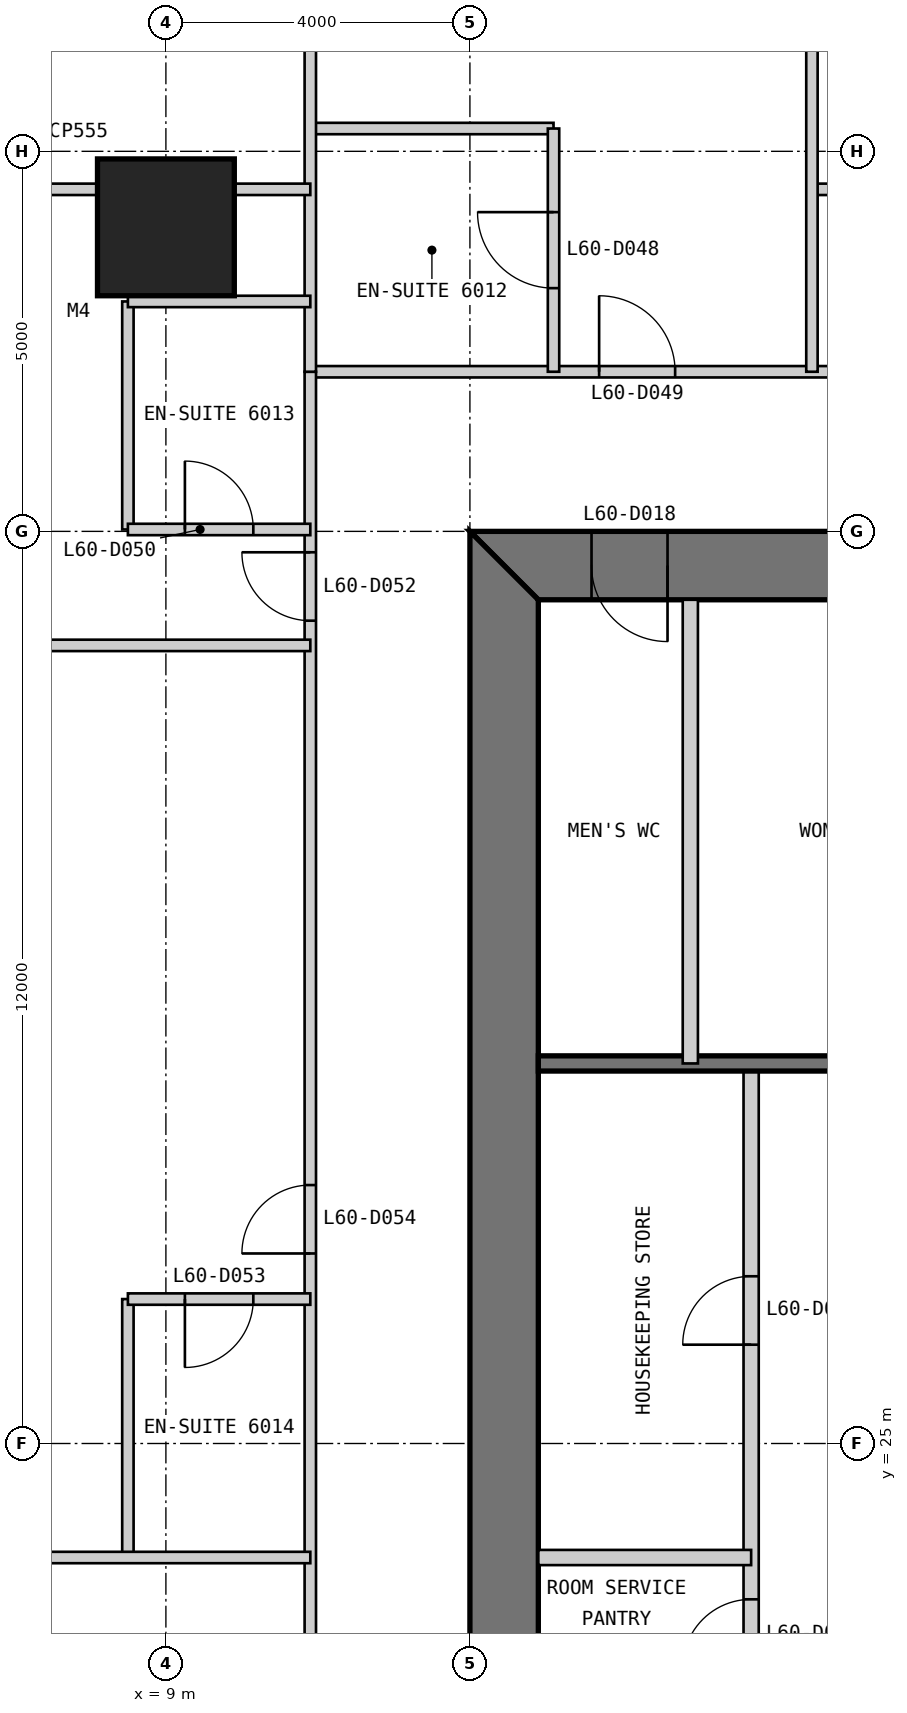
"""IFC4 building model, lengths in metres.
Left out: names, types, materials, properties, quantities, classifications, styles, units other than length and angle.
Written with IfcOpenShell. Run it as: python <this file> out.ifc"""

import sys

from ifc_helpers import new_model, si_unit, direction, frame, frame_2d, origin, origin_2d, place, context, subcontext, project, spatial, polyline, rectangle, outline, extrude, element, fill, save


model = new_model("IFC4")
c1 = context("Model", 3, precision=1e-05, world=origin(), true_north=direction((0.0, 1.0)))
c2 = subcontext(c1, "Body", "Model", "MODEL_VIEW")
j1 = project(units=[si_unit("LENGTHUNIT", "METRE"), si_unit("PLANEANGLEUNIT", "RADIAN")], contexts=[c1])
p1 = place(None, origin())
s1 = spatial("IfcSite", under=j1, at=p1, CompositionType="ELEMENT")
p2 = place(p1, origin())
s2 = spatial("IfcBuilding", under=s1, at=p2, CompositionType="ELEMENT")
p3 = place(p2, frame((0.0, 0.0, 256.0)))
s3 = spatial("IfcBuildingStorey", under=s2, at=p3, CompositionType="ELEMENT", Elevation=256.0)
p4 = place(p3, frame((9.0, 41.0, 0.0), z_axis=(0.0, 0.0, 1.0), x_axis=(1.0, 0.0, 0.0)))
e1 = element("IfcColumn", 1, at=p4, inside=s3, PredefinedType="COLUMN", context=c2, shape_type="SweptSolid", body=[
    extrude(rectangle(XDim=1.8, YDim=1.8, at=origin_2d()), origin(), (0.0, 0.0, 1.0), 3.4),
])
p5 = place(p3, frame((37.0, 36.55, 0.0), z_axis=(0.0, 0.0, 1.0), x_axis=(-1.0, 0.0, 0.0)))
e2 = element("IfcWall", 2, at=p5, inside=s3, PredefinedType="SHEAR", context=c2, shape_type="SweptSolid", body=[
    extrude(outline(polyline([(0.0, -0.45), (24.0, -0.45), (23.1, 0.45), (0.9, 0.45), (0.0, -0.45)])), origin(), (0.0, 0.0, 1.0), 3.4),
])
p6 = place(p5, frame((4.9, 0.0, 0.0)))
e3 = element("IfcOpeningElement", 3, at=p6, cuts=e2, PredefinedType="OPENING", context=c2, shape_type="SweptSolid", body=[
    extrude(rectangle(XDim=1.0, YDim=2.2, at=frame_2d((0.5, 1.1))), frame((0.0, 0.46, 0.0), z_axis=(0.0, -1.0, 0.0), x_axis=(1.0, 0.0, 0.0)), (0.0, 0.0, 1.0), 0.92),
])
p7 = place(p5, frame((8.9, 0.0, 0.0)))
e4 = element("IfcOpeningElement", 4, at=p7, cuts=e2, PredefinedType="OPENING", context=c2, shape_type="SweptSolid", body=[
    extrude(rectangle(XDim=1.1, YDim=2.2, at=frame_2d((0.55, 1.1))), frame((0.0, 0.46, 0.0), z_axis=(0.0, -1.0, 0.0), x_axis=(1.0, 0.0, 0.0)), (0.0, 0.0, 1.0), 0.92),
])
p8 = place(p5, frame((15.05, 0.0, 0.0)))
e5 = element("IfcOpeningElement", 5, at=p8, cuts=e2, PredefinedType="OPENING", context=c2, shape_type="SweptSolid", body=[
    extrude(rectangle(XDim=0.9, YDim=2.2, at=frame_2d((0.45, 1.1))), frame((0.0, 0.46, 0.0), z_axis=(0.0, -1.0, 0.0), x_axis=(1.0, 0.0, 0.0)), (0.0, 0.0, 1.0), 0.92),
])
p9 = place(p5, frame((17.9, 0.0, 0.0)))
e6 = element("IfcOpeningElement", 6, at=p9, cuts=e2, PredefinedType="OPENING", context=c2, shape_type="SweptSolid", body=[
    extrude(rectangle(XDim=1.0, YDim=2.2, at=frame_2d((0.5, 1.1))), frame((0.0, 0.46, 0.0), z_axis=(0.0, -1.0, 0.0), x_axis=(1.0, 0.0, 0.0)), (0.0, 0.0, 1.0), 0.92),
])
p10 = place(p5, frame((21.4, 0.0, 0.0)))
e7 = element("IfcOpeningElement", 7, at=p10, cuts=e2, PredefinedType="OPENING", context=c2, shape_type="SweptSolid", body=[
    extrude(rectangle(XDim=1.0, YDim=2.2, at=frame_2d((0.5, 1.1))), frame((0.0, 0.46, 0.0), z_axis=(0.0, -1.0, 0.0), x_axis=(1.0, 0.0, 0.0)), (0.0, 0.0, 1.0), 0.92),
])
p11 = place(p3, frame((13.45, 36.1, 0.0), z_axis=(0.0, 0.0, 1.0), x_axis=(0.0, -1.0, 0.0)))
e8 = element("IfcWall", 8, at=p11, inside=s3, PredefinedType="SHEAR", context=c2, shape_type="SweptSolid", body=[
    extrude(outline(polyline([(-0.9, -0.45), (23.1, -0.45), (22.2, 0.45), (0.0, 0.45), (-0.9, -0.45)])), origin(), (0.0, 0.0, 1.0), 3.4),
])
p12 = place(p11, frame((20.2, 0.0, 0.0)))
e9 = element("IfcOpeningElement", 9, at=p12, cuts=e8, PredefinedType="OPENING", context=c2, shape_type="SweptSolid", body=[
    extrude(rectangle(XDim=1.0, YDim=2.2, at=frame_2d((0.5, 1.1))), frame((0.0, 0.46, 0.0), z_axis=(0.0, -1.0, 0.0), x_axis=(1.0, 0.0, 0.0)), (0.0, 0.0, 1.0), 0.92),
])
p13 = place(p11, frame((17.25, 0.0, 0.0)))
e10 = element("IfcOpeningElement", 10, at=p13, cuts=e8, PredefinedType="OPENING", context=c2, shape_type="SweptSolid", body=[
    extrude(rectangle(XDim=0.9, YDim=2.2, at=frame_2d((0.45, 1.1))), frame((0.0, 0.46, 0.0), z_axis=(0.0, -1.0, 0.0), x_axis=(1.0, 0.0, 0.0)), (0.0, 0.0, 1.0), 0.92),
])
p14 = place(p3, frame((16.7, 13.9, 0.0), z_axis=(0.0, 0.0, 1.0), x_axis=(0.0, 1.0, 0.0)))
e11 = element("IfcWall", 11, at=p14, inside=s3, PredefinedType="PARTITIONING", context=c2, shape_type="SweptSolid", body=[
    extrude(rectangle(XDim=16.1, YDim=0.2, at=frame_2d((8.05, 0.0))), origin(), (0.0, 0.0, 1.0), 3.2),
])
p15 = place(p14, frame((8.15, 0.0, 0.0)))
e12 = element("IfcOpeningElement", 12, at=p15, cuts=e11, PredefinedType="OPENING", context=c2, shape_type="SweptSolid", body=[
    extrude(rectangle(XDim=0.9, YDim=2.2, at=frame_2d((0.45, 1.1))), frame((0.0, 0.11, 0.0), z_axis=(0.0, -1.0, 0.0), x_axis=(1.0, 0.0, 0.0)), (0.0, 0.0, 1.0), 0.22),
])
p16 = place(p14, frame((12.4, 0.0, 0.0)))
e13 = element("IfcOpeningElement", 13, at=p16, cuts=e11, PredefinedType="OPENING", context=c2, shape_type="SweptSolid", body=[
    extrude(rectangle(XDim=0.9, YDim=2.2, at=frame_2d((0.45, 1.1))), frame((0.0, 0.11, 0.0), z_axis=(0.0, -1.0, 0.0), x_axis=(1.0, 0.0, 0.0)), (0.0, 0.0, 1.0), 0.22),
])
p17 = place(p3, frame((13.9, 23.5, 0.0), z_axis=(0.0, 0.0, 1.0), x_axis=(1.0, 0.0, 0.0)))
e14 = element("IfcWall", 14, at=p17, inside=s3, PredefinedType="PARTITIONING", context=c2, shape_type="SweptSolid", body=[
    extrude(rectangle(XDim=2.8, YDim=0.2, at=frame_2d((1.4, 0.0))), origin(), (0.0, 0.0, 1.0), 3.2),
])
p18 = place(p3, frame((29.7, 30.0, 0.0), z_axis=(0.0, 0.0, 1.0), x_axis=(-1.0, 0.0, 0.0)))
e15 = element("IfcWall", 15, at=p18, inside=s3, PredefinedType="SOLIDWALL", context=c2, shape_type="SweptSolid", body=[
    extrude(rectangle(XDim=15.8, YDim=0.2, at=frame_2d((7.9, 0.0))), origin(), (0.0, 0.0, 1.0), 3.2),
])
p19 = place(p3, frame((15.9, 36.1, 0.0), z_axis=(0.0, 0.0, 1.0), x_axis=(0.0, -1.0, 0.0)))
e16 = element("IfcWall", 16, at=p19, inside=s3, PredefinedType="PARTITIONING", context=c2, shape_type="SweptSolid", body=[
    extrude(rectangle(XDim=6.1, YDim=0.2, at=frame_2d((3.05, 0.0))), origin(), (0.0, 0.0, 1.0), 3.2),
])
p20 = place(p3, frame((39.1, 39.1, 0.0), z_axis=(0.0, 0.0, 1.0), x_axis=(-1.0, 0.0, 0.0)))
e17 = element("IfcWall", 17, at=p20, inside=s3, PredefinedType="PARTITIONING", context=c2, shape_type="SweptSolid", body=[
    extrude(rectangle(XDim=28.2, YDim=0.15, at=frame_2d((14.1, 0.0))), origin(), (0.0, 0.0, 1.0), 3.25),
])
p21 = place(p20, frame((2.375, 0.0, 0.0)))
e18 = element("IfcOpeningElement", 18, at=p21, cuts=e17, PredefinedType="OPENING", context=c2, shape_type="SweptSolid", body=[
    extrude(rectangle(XDim=0.9, YDim=2.1, at=frame_2d((0.45, 1.05))), frame((0.0, 0.085, 0.0), z_axis=(0.0, -1.0, 0.0), x_axis=(1.0, 0.0, 0.0)), (0.0, 0.0, 1.0), 0.17),
])
p22 = place(p20, frame((10.7, 0.0, 0.0)))
e19 = element("IfcOpeningElement", 19, at=p22, cuts=e17, PredefinedType="OPENING", context=c2, shape_type="SweptSolid", body=[
    extrude(rectangle(XDim=0.9, YDim=2.1, at=frame_2d((0.45, 1.05))), frame((0.0, 0.085, 0.0), z_axis=(0.0, -1.0, 0.0), x_axis=(1.0, 0.0, 0.0)), (0.0, 0.0, 1.0), 0.17),
])
p23 = place(p20, frame((17.1, 0.0, 0.0)))
e20 = element("IfcOpeningElement", 20, at=p23, cuts=e17, PredefinedType="OPENING", context=c2, shape_type="SweptSolid", body=[
    extrude(rectangle(XDim=0.9, YDim=2.1, at=frame_2d((0.45, 1.05))), frame((0.0, 0.085, 0.0), z_axis=(0.0, -1.0, 0.0), x_axis=(1.0, 0.0, 0.0)), (0.0, 0.0, 1.0), 0.17),
])
p24 = place(p20, frame((23.4, 0.0, 0.0)))
e21 = element("IfcOpeningElement", 21, at=p24, cuts=e17, PredefinedType="OPENING", context=c2, shape_type="SweptSolid", body=[
    extrude(rectangle(XDim=1.0, YDim=2.1, at=frame_2d((0.5, 1.05))), frame((0.0, 0.085, 0.0), z_axis=(0.0, -1.0, 0.0), x_axis=(1.0, 0.0, 0.0)), (0.0, 0.0, 1.0), 0.17),
])
p25 = place(p3, frame((20.5, 41.5, 0.0), z_axis=(0.0, 0.0, 1.0), x_axis=(-1.0, 0.0, 0.0)))
e22 = element("IfcWall", 22, at=p25, inside=s3, PredefinedType="PARTITIONING", context=c2, shape_type="SweptSolid", body=[
    extrude(rectangle(XDim=3.0, YDim=0.15, at=frame_2d((1.5, 0.0))), origin(), (0.0, 0.0, 1.0), 3.25),
])
p26 = place(p3, frame((17.5, 49.85, 0.0), z_axis=(0.0, 0.0, 1.0), x_axis=(0.0, -1.0, 0.0)))
e23 = element("IfcWall", 23, at=p26, inside=s3, PredefinedType="PARTITIONING", context=c2, shape_type="SweptSolid", body=[
    extrude(rectangle(XDim=10.75, YDim=0.15, at=frame_2d((5.375, 0.0))), origin(), (0.0, 0.0, 1.0), 3.25),
])
p27 = place(p3, frame((14.1, 42.3, 0.0), z_axis=(0.0, 0.0, 1.0), x_axis=(-1.0, 0.0, 0.0)))
e24 = element("IfcWall", 24, at=p27, inside=s3, PredefinedType="PARTITIONING", context=c2, shape_type="SweptSolid", body=[
    extrude(rectangle(XDim=3.2, YDim=0.15, at=frame_2d((1.6, 0.0))), origin(), (0.0, 0.0, 1.0), 3.25),
])
p28 = place(p3, frame((14.1, 42.3, 0.0), z_axis=(0.0, 0.0, 1.0), x_axis=(0.0, -1.0, 0.0)))
e25 = element("IfcWall", 25, at=p28, inside=s3, PredefinedType="PARTITIONING", context=c2, shape_type="SweptSolid", body=[
    extrude(rectangle(XDim=3.2, YDim=0.15, at=frame_2d((1.6, 0.0))), origin(), (0.0, 0.0, 1.0), 3.25),
])
p29 = place(p28, frame((1.1, 0.0, 0.0)))
e26 = element("IfcOpeningElement", 26, at=p29, cuts=e25, PredefinedType="OPENING", context=c2, shape_type="SweptSolid", body=[
    extrude(rectangle(XDim=1.0, YDim=2.1, at=frame_2d((0.5, 1.05))), frame((0.0, 0.085, 0.0), z_axis=(0.0, -1.0, 0.0), x_axis=(1.0, 0.0, 0.0)), (0.0, 0.0, 1.0), 0.17),
])
p30 = place(p3, frame((10.9, 39.1, 0.0), z_axis=(0.0, 0.0, 1.0), x_axis=(0.0, -1.0, 0.0)))
e27 = element("IfcWall", 27, at=p30, inside=s3, PredefinedType="PARTITIONING", context=c2, shape_type="SweptSolid", body=[
    extrude(rectangle(XDim=28.2, YDim=0.15, at=frame_2d((14.1, 0.0))), origin(), (0.0, 0.0, 1.0), 3.25),
])
p31 = place(p30, frame((2.375, 0.0, 0.0)))
e28 = element("IfcOpeningElement", 28, at=p31, cuts=e27, PredefinedType="OPENING", context=c2, shape_type="SweptSolid", body=[
    extrude(rectangle(XDim=0.9, YDim=2.1, at=frame_2d((0.45, 1.05))), frame((0.0, 0.085, 0.0), z_axis=(0.0, -1.0, 0.0), x_axis=(1.0, 0.0, 0.0)), (0.0, 0.0, 1.0), 0.17),
])
p32 = place(p30, frame((10.7, 0.0, 0.0)))
e29 = element("IfcOpeningElement", 29, at=p32, cuts=e27, PredefinedType="OPENING", context=c2, shape_type="SweptSolid", body=[
    extrude(rectangle(XDim=0.9, YDim=2.1, at=frame_2d((0.45, 1.05))), frame((0.0, 0.085, 0.0), z_axis=(0.0, -1.0, 0.0), x_axis=(1.0, 0.0, 0.0)), (0.0, 0.0, 1.0), 0.17),
])
p33 = place(p30, frame((17.1, 0.0, 0.0)))
e30 = element("IfcOpeningElement", 30, at=p33, cuts=e27, PredefinedType="OPENING", context=c2, shape_type="SweptSolid", body=[
    extrude(rectangle(XDim=0.9, YDim=2.1, at=frame_2d((0.45, 1.05))), frame((0.0, 0.085, 0.0), z_axis=(0.0, -1.0, 0.0), x_axis=(1.0, 0.0, 0.0)), (0.0, 0.0, 1.0), 0.17),
])
p34 = place(p30, frame((23.7, 0.0, 0.0)))
e31 = element("IfcOpeningElement", 31, at=p34, cuts=e27, PredefinedType="OPENING", context=c2, shape_type="SweptSolid", body=[
    extrude(rectangle(XDim=0.9, YDim=2.1, at=frame_2d((0.45, 1.05))), frame((0.0, 0.085, 0.0), z_axis=(0.0, -1.0, 0.0), x_axis=(1.0, 0.0, 0.0)), (0.0, 0.0, 1.0), 0.17),
])
p35 = place(p3, frame((10.9, 49.85, 0.0), z_axis=(0.0, 0.0, 1.0), x_axis=(0.0, -1.0, 0.0)))
e32 = element("IfcWall", 32, at=p35, inside=s3, PredefinedType="PARTITIONING", context=c2, shape_type="SweptSolid", body=[
    extrude(rectangle(XDim=10.75, YDim=0.15, at=frame_2d((5.375, 0.0))), origin(), (0.0, 0.0, 1.0), 3.25),
])
p36 = place(p3, frame((8.5, 40.025, 0.0), z_axis=(0.0, 0.0, 1.0), x_axis=(0.0, -1.0, 0.0)))
e33 = element("IfcWall", 33, at=p36, inside=s3, PredefinedType="PARTITIONING", context=c2, shape_type="SweptSolid", body=[
    extrude(rectangle(XDim=3.0, YDim=0.15, at=frame_2d((1.5, 0.0))), origin(), (0.0, 0.0, 1.0), 3.25),
])
p37 = place(p3, frame((8.5, 37.025, 0.0), z_axis=(0.0, 0.0, 1.0), x_axis=(1.0, 0.0, 0.0)))
e34 = element("IfcWall", 34, at=p37, inside=s3, PredefinedType="PARTITIONING", context=c2, shape_type="SweptSolid", body=[
    extrude(rectangle(XDim=2.4, YDim=0.15, at=frame_2d((1.2, 0.0))), origin(), (0.0, 0.0, 1.0), 2.404),
])
p38 = place(p37, frame((0.75, 0.0, 0.0)))
e35 = element("IfcOpeningElement", 35, at=p38, cuts=e34, PredefinedType="OPENING", context=c2, shape_type="SweptSolid", body=[
    extrude(rectangle(XDim=0.9, YDim=2.1, at=frame_2d((0.45, 1.05))), frame((0.0, 0.085, 0.0), z_axis=(0.0, -1.0, 0.0), x_axis=(1.0, 0.0, 0.0)), (0.0, 0.0, 1.0), 0.17),
])
p39 = place(p3, frame((8.5, 40.025, 0.0), z_axis=(0.0, 0.0, 1.0), x_axis=(1.0, 0.0, 0.0)))
e36 = element("IfcWall", 36, at=p39, inside=s3, PredefinedType="PARTITIONING", context=c2, shape_type="SweptSolid", body=[
    extrude(rectangle(XDim=2.4, YDim=0.15, at=frame_2d((1.2, 0.0))), origin(), (0.0, 0.0, 1.0), 3.25),
])
p40 = place(p3, frame((0.15, 41.5, 0.0), z_axis=(0.0, 0.0, 1.0), x_axis=(1.0, 0.0, 0.0)))
e37 = element("IfcWall", 37, at=p40, inside=s3, PredefinedType="PARTITIONING", context=c2, shape_type="SweptSolid", body=[
    extrude(rectangle(XDim=10.75, YDim=0.15, at=frame_2d((5.375, 0.0))), origin(), (0.0, 0.0, 1.0), 3.25),
])
p41 = place(p40, frame((5.0, 0.0, 0.0)))
e38 = element("IfcOpeningElement", 38, at=p41, cuts=e37, PredefinedType="OPENING", context=c2, shape_type="SweptSolid", body=[
    extrude(rectangle(XDim=0.9, YDim=2.1, at=frame_2d((0.45, 1.05))), frame((0.0, 0.085, 0.0), z_axis=(0.0, -1.0, 0.0), x_axis=(1.0, 0.0, 0.0)), (0.0, 0.0, 1.0), 0.17),
])
p42 = place(p3, frame((0.15, 35.5, 0.0), z_axis=(0.0, 0.0, 1.0), x_axis=(1.0, 0.0, 0.0)))
e39 = element("IfcWall", 39, at=p42, inside=s3, PredefinedType="PARTITIONING", context=c2, shape_type="SweptSolid", body=[
    extrude(rectangle(XDim=10.75, YDim=0.15, at=frame_2d((5.375, 0.0))), origin(), (0.0, 0.0, 1.0), 3.25),
])
p43 = place(p3, frame((8.5, 26.9, 0.0), z_axis=(0.0, 0.0, 1.0), x_axis=(0.0, -1.0, 0.0)))
e40 = element("IfcWall", 40, at=p43, inside=s3, PredefinedType="PARTITIONING", context=c2, shape_type="SweptSolid", body=[
    extrude(rectangle(XDim=3.4, YDim=0.15, at=frame_2d((1.7, 0.0))), origin(), (0.0, 0.0, 1.0), 3.25),
])
p44 = place(p3, frame((8.5, 26.9, 0.0), z_axis=(0.0, 0.0, 1.0), x_axis=(1.0, 0.0, 0.0)))
e41 = element("IfcWall", 41, at=p44, inside=s3, PredefinedType="PARTITIONING", context=c2, shape_type="SweptSolid", body=[
    extrude(rectangle(XDim=2.4, YDim=0.15, at=frame_2d((1.2, 0.0))), origin(), (0.0, 0.0, 1.0), 3.25),
])
p45 = place(p44, frame((0.75, 0.0, 0.0)))
e42 = element("IfcOpeningElement", 42, at=p45, cuts=e41, PredefinedType="OPENING", context=c2, shape_type="SweptSolid", body=[
    extrude(rectangle(XDim=0.9, YDim=2.1, at=frame_2d((0.45, 1.05))), frame((0.0, 0.085, 0.0), z_axis=(0.0, -1.0, 0.0), x_axis=(1.0, 0.0, 0.0)), (0.0, 0.0, 1.0), 0.17),
])
p46 = place(p3, frame((0.15, 23.5, 0.0), z_axis=(0.0, 0.0, 1.0), x_axis=(1.0, 0.0, 0.0)))
e43 = element("IfcWall", 43, at=p46, inside=s3, PredefinedType="PARTITIONING", context=c2, shape_type="SweptSolid", body=[
    extrude(rectangle(XDim=10.75, YDim=0.15, at=frame_2d((5.375, 0.0))), origin(), (0.0, 0.0, 1.0), 3.25),
])
p47 = place(p15, origin())
e44 = element("IfcDoor", 44, at=p47, inside=s3, OperationType="SINGLE_SWING_LEFT", PredefinedType="DOOR", context=c2, shape_type="SweptSolid", body=[
    extrude(rectangle(XDim=0.9, YDim=2.2, at=frame_2d((0.45, 1.1))), frame((0.0, 0.025, 0.0), z_axis=(0.0, -1.0, 0.0), x_axis=(1.0, 0.0, 0.0)), (0.0, 0.0, 1.0), 0.05),
])
fill(e12, e44)
p48 = place(p16, origin())
e45 = element("IfcDoor", 45, at=p48, inside=s3, OperationType="SINGLE_SWING_LEFT", PredefinedType="DOOR", context=c2, shape_type="SweptSolid", body=[
    extrude(rectangle(XDim=0.9, YDim=2.2, at=frame_2d((0.45, 1.1))), frame((0.0, 0.025, 0.0), z_axis=(0.0, -1.0, 0.0), x_axis=(1.0, 0.0, 0.0)), (0.0, 0.0, 1.0), 0.05),
])
fill(e13, e45)
p49 = place(p10, origin())
e46 = element("IfcDoor", 46, at=p49, inside=s3, OperationType="SINGLE_SWING_LEFT", PredefinedType="DOOR", context=c2, shape_type="SweptSolid", body=[
    extrude(rectangle(XDim=1.0, YDim=2.2, at=frame_2d((0.5, 1.1))), frame((0.0, 0.025, 0.0), z_axis=(0.0, -1.0, 0.0), x_axis=(1.0, 0.0, 0.0)), (0.0, 0.0, 1.0), 0.05),
    extrude(outline(polyline([(0.0, 0.0), (0.04, 0.0), (0.04, 2.16), (0.96, 2.16), (0.96, 0.0), (1.0, 0.0), (1.0, 2.2), (0.0, 2.2), (0.0, 0.0)])), frame((0.0, 0.3, 0.0), z_axis=(0.0, -1.0, 0.0), x_axis=(1.0, 0.0, 0.0)), (0.0, 0.0, 1.0), 0.6),
])
fill(e7, e46)
p50 = place(p29, frame((1.0, 0.0, 0.0), z_axis=(0.0, 0.0, 1.0), x_axis=(-1.0, 0.0, 0.0)))
e47 = element("IfcDoor", 47, at=p50, inside=s3, OperationType="SINGLE_SWING_RIGHT", PredefinedType="DOOR", context=c2, shape_type="SweptSolid", body=[
    extrude(rectangle(XDim=1.0, YDim=2.1, at=frame_2d((0.5, 1.05))), frame((0.0, 0.025, 0.0), z_axis=(0.0, -1.0, 0.0), x_axis=(1.0, 0.0, 0.0)), (0.0, 0.0, 1.0), 0.05),
])
fill(e26, e47)
p51 = place(p24, frame((1.0, 0.0, 0.0), z_axis=(0.0, 0.0, 1.0), x_axis=(-1.0, 0.0, 0.0)))
e48 = element("IfcDoor", 48, at=p51, inside=s3, OperationType="SINGLE_SWING_LEFT", PredefinedType="DOOR", context=c2, shape_type="SweptSolid", body=[
    extrude(rectangle(XDim=1.0, YDim=2.1, at=frame_2d((0.5, 1.05))), frame((0.0, 0.025, 0.0), z_axis=(0.0, -1.0, 0.0), x_axis=(1.0, 0.0, 0.0)), (0.0, 0.0, 1.0), 0.05),
])
fill(e21, e48)
p52 = place(p38, origin())
e49 = element("IfcDoor", 49, at=p52, inside=s3, OperationType="SINGLE_SWING_LEFT", PredefinedType="DOOR", context=c2, shape_type="SweptSolid", body=[
    extrude(rectangle(XDim=0.9, YDim=2.1, at=frame_2d((0.45, 1.05))), frame((0.0, 0.025, 0.0), z_axis=(0.0, -1.0, 0.0), x_axis=(1.0, 0.0, 0.0)), (0.0, 0.0, 1.0), 0.05),
])
fill(e35, e49)
p53 = place(p31, frame((0.9, 0.0, 0.0), z_axis=(0.0, 0.0, 1.0), x_axis=(-1.0, 0.0, 0.0)))
e50 = element("IfcDoor", 50, at=p53, inside=s3, OperationType="SINGLE_SWING_RIGHT", PredefinedType="DOOR", context=c2, shape_type="SweptSolid", body=[
    extrude(rectangle(XDim=0.9, YDim=2.1, at=frame_2d((0.45, 1.05))), frame((0.0, 0.025, 0.0), z_axis=(0.0, -1.0, 0.0), x_axis=(1.0, 0.0, 0.0)), (0.0, 0.0, 1.0), 0.05),
])
fill(e28, e50)
p54 = place(p45, frame((0.9, 0.0, 0.0), z_axis=(0.0, 0.0, 1.0), x_axis=(-1.0, 0.0, 0.0)))
e51 = element("IfcDoor", 51, at=p54, inside=s3, OperationType="SINGLE_SWING_RIGHT", PredefinedType="DOOR", context=c2, shape_type="SweptSolid", body=[
    extrude(rectangle(XDim=0.9, YDim=2.1, at=frame_2d((0.45, 1.05))), frame((0.0, 0.025, 0.0), z_axis=(0.0, -1.0, 0.0), x_axis=(1.0, 0.0, 0.0)), (0.0, 0.0, 1.0), 0.05),
])
fill(e42, e51)
p55 = place(p32, frame((0.9, 0.0, 0.0), z_axis=(0.0, 0.0, 1.0), x_axis=(-1.0, 0.0, 0.0)))
e52 = element("IfcDoor", 52, at=p55, inside=s3, OperationType="SINGLE_SWING_LEFT", PredefinedType="DOOR", context=c2, shape_type="SweptSolid", body=[
    extrude(rectangle(XDim=0.9, YDim=2.1, at=frame_2d((0.45, 1.05))), frame((0.0, 0.025, 0.0), z_axis=(0.0, -1.0, 0.0), x_axis=(1.0, 0.0, 0.0)), (0.0, 0.0, 1.0), 0.05),
])
fill(e29, e52)
save(model, sys.argv[1])
